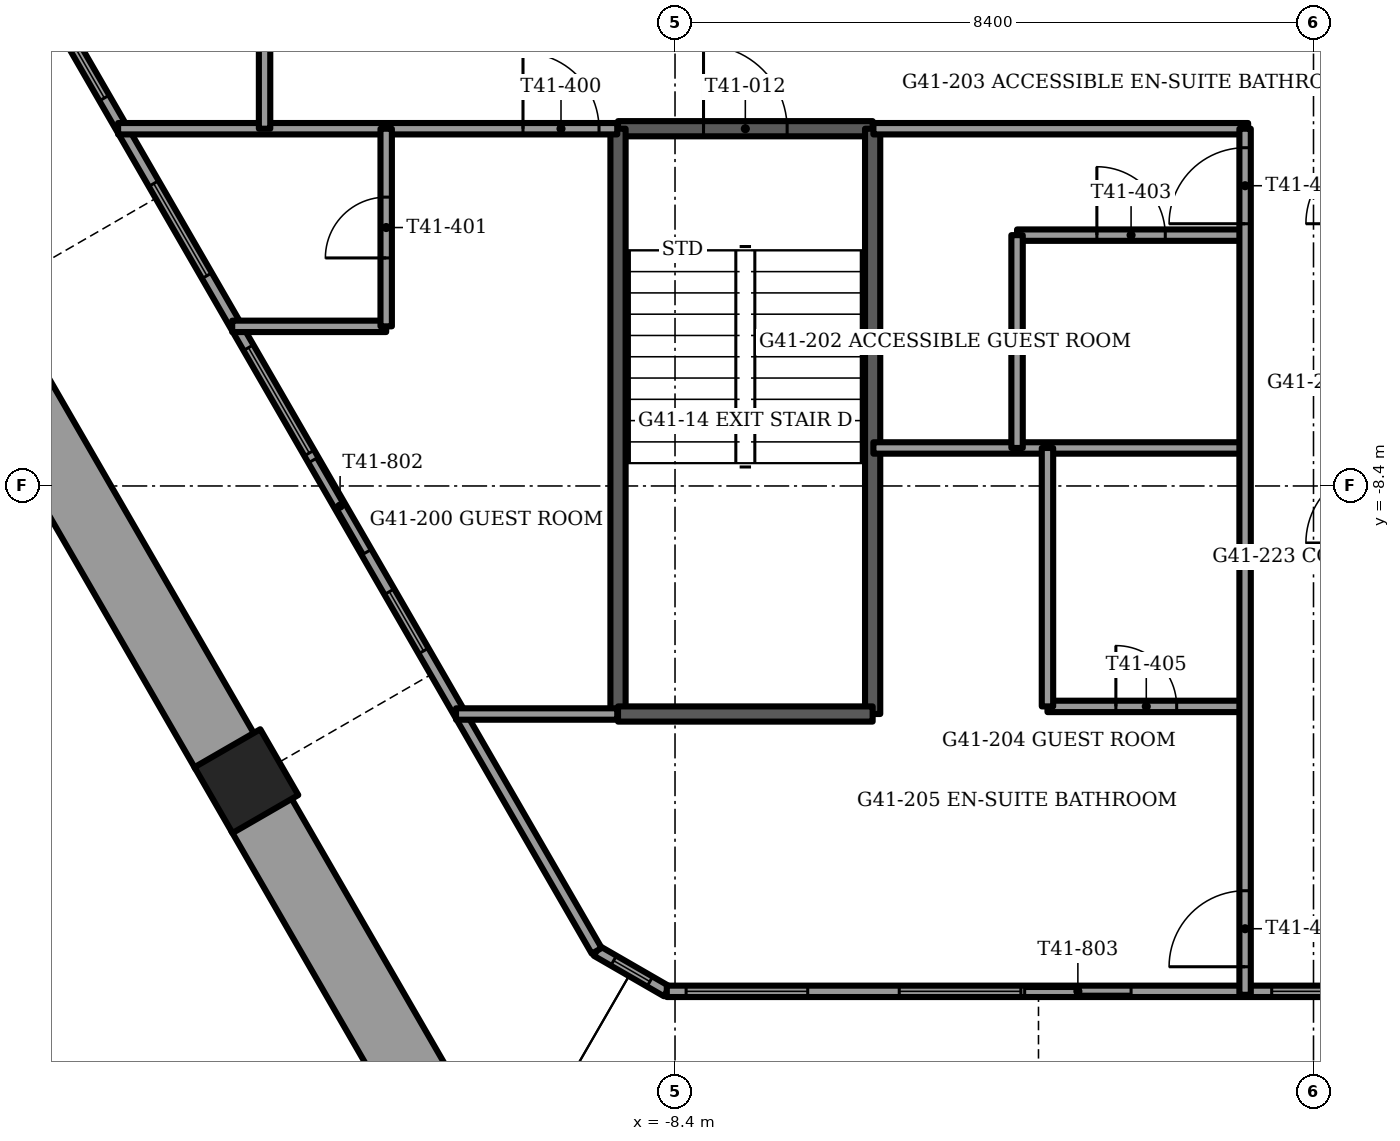
"""IFC4 building model, lengths in metres.
Left out: names, types, materials, properties, quantities, classifications, styles, units other than length and angle.
Written with IfcOpenShell. Run it as: python <this file> out.ifc"""

import sys

from ifc_helpers import new_model, si_unit, direction, frame, frame_2d, origin, origin_2d, place, context, subcontext, project, spatial, rectangle, extrude, element, fill, save


model = new_model("IFC4")
c1 = context("Model", 3, precision=1e-05, world=origin(), true_north=direction((0.0, 1.0)))
c2 = subcontext(c1, "Body", "Model", "MODEL_VIEW")
j1 = project(units=[si_unit("LENGTHUNIT", "METRE"), si_unit("PLANEANGLEUNIT", "RADIAN")], contexts=[c1])
p1 = place(None, origin())
s1 = spatial("IfcSite", under=j1, at=p1, CompositionType="ELEMENT")
p2 = place(p1, origin())
s2 = spatial("IfcBuilding", under=s1, at=p2, CompositionType="ELEMENT")
p3 = place(p2, frame((0.0, 0.0, 168.25)))
s3 = spatial("IfcBuildingStorey", under=s2, at=p3, CompositionType="ELEMENT", Elevation=168.25)
p4 = place(p3, frame((-14.039, -12.283, -1.2), z_axis=(0.0, 0.0, 1.0), x_axis=(-0.5, 0.866025403784, 0.0)))
e1 = element("IfcColumn", 1, at=p4, inside=s3, PredefinedType="COLUMN", context=c2, shape_type="SweptSolid", body=[
    extrude(rectangle(XDim=1.0, YDim=1.0, at=origin_2d()), origin(), (0.0, 0.0, 1.0), 3.75),
])
p5 = place(p3, frame((-17.466, -6.449, 0.0), z_axis=(0.0, 0.0, 1.0), x_axis=(0.500013351051, -0.866017695414, 0.0)))
e2 = element("IfcWall", 2, at=p5, inside=s3, PredefinedType="PARAPET", context=c2, shape_type="SweptSolid", body=[
    extrude(rectangle(XDim=6.296, YDim=0.9, at=frame_2d((3.148, 0.0))), origin(), (0.0, 0.0, 1.0), 1.1),
])
p6 = place(p3, frame((-13.847, -12.715, 0.0), z_axis=(0.0, 0.0, 1.0), x_axis=(0.499961976493, -0.866047355554, 0.0)))
e3 = element("IfcWall", 3, at=p6, inside=s3, PredefinedType="PARAPET", context=c2, shape_type="SweptSolid", body=[
    extrude(rectangle(XDim=5.529, YDim=0.9, at=frame_2d((2.765, 0.0))), origin(), (0.0, 0.0, 1.0), 1.1),
])
p7 = place(p3, frame((-17.287, -0.909, 0.0), z_axis=(0.0, 0.0, 1.0), x_axis=(0.500004460396, -0.866022828558, 0.0)))
e4 = element("IfcWall", 4, at=p7, inside=s3, PredefinedType="SOLIDWALL", context=c2, shape_type="SweptSolid", body=[
    extrude(rectangle(XDim=15.712, YDim=0.15, at=frame_2d((7.856, 0.0))), origin(), (0.0, 0.0, 1.0), 3.45),
])
p8 = place(p7, frame((1.856, 0.0, 0.15)))
e5 = element("IfcOpeningElement", 5, at=p8, cuts=e4, PredefinedType="OPENING", context=c2, shape_type="SweptSolid", body=[
    extrude(rectangle(XDim=0.9, YDim=2.85, at=frame_2d((0.45, 1.425))), frame((0.0, 0.075, 0.0), z_axis=(0.0, -1.0, 0.0), x_axis=(1.0, 0.0, 0.0)), (0.0, 0.0, 1.0), 0.15),
])
p9 = place(p7, frame((4.056, 0.0, 0.15)))
e6 = element("IfcOpeningElement", 6, at=p9, cuts=e4, PredefinedType="OPENING", context=c2, shape_type="SweptSolid", body=[
    extrude(rectangle(XDim=1.4, YDim=2.85, at=frame_2d((0.7, 1.425))), frame((0.0, 0.075, 0.0), z_axis=(0.0, -1.0, 0.0), x_axis=(1.0, 0.0, 0.0)), (0.0, 0.0, 1.0), 0.15),
])
p10 = place(p7, frame((6.549, 0.0, 0.15)))
e7 = element("IfcOpeningElement", 7, at=p10, cuts=e4, PredefinedType="OPENING", context=c2, shape_type="SweptSolid", body=[
    extrude(rectangle(XDim=1.6, YDim=2.85, at=frame_2d((0.8, 1.425))), frame((0.0, 0.075, 0.0), z_axis=(0.0, -1.0, 0.0), x_axis=(1.0, 0.0, 0.0)), (0.0, 0.0, 1.0), 0.15),
])
p11 = place(p7, frame((8.256, 0.0, 0.0)))
e8 = element("IfcOpeningElement", 8, at=p11, cuts=e4, PredefinedType="OPENING", context=c2, shape_type="SweptSolid", body=[
    extrude(rectangle(XDim=1.4, YDim=2.4, at=frame_2d((0.7, 1.2))), frame((0.0, 0.075, 0.0), z_axis=(0.0, -1.0, 0.0), x_axis=(1.0, 0.0, 0.0)), (0.0, 0.0, 1.0), 0.15),
])
p12 = place(p7, frame((10.256, 0.0, 0.15)))
e9 = element("IfcOpeningElement", 9, at=p12, cuts=e4, PredefinedType="OPENING", context=c2, shape_type="SweptSolid", body=[
    extrude(rectangle(XDim=0.9, YDim=2.85, at=frame_2d((0.45, 1.425))), frame((0.0, 0.075, 0.0), z_axis=(0.0, -1.0, 0.0), x_axis=(1.0, 0.0, 0.0)), (0.0, 0.0, 1.0), 0.15),
])
p13 = place(p3, frame((-8.508, -15.049, 0.0), z_axis=(0.0, 0.0, 1.0), x_axis=(1.0, 0.0, 0.0)))
e10 = element("IfcWall", 10, at=p13, inside=s3, PredefinedType="SOLIDWALL", context=c2, shape_type="SweptSolid", body=[
    extrude(rectangle(XDim=17.016, YDim=0.15, at=frame_2d((8.508, 0.0))), origin(), (0.0, 0.0, 1.0), 3.45),
])
p14 = place(p13, frame((3.058, 0.0, 0.15)))
e11 = element("IfcOpeningElement", 11, at=p14, cuts=e10, PredefinedType="OPENING", context=c2, shape_type="SweptSolid", body=[
    extrude(rectangle(XDim=1.6, YDim=2.85, at=frame_2d((0.8, 1.425))), frame((0.0, 0.075, 0.0), z_axis=(0.0, -1.0, 0.0), x_axis=(1.0, 0.0, 0.0)), (0.0, 0.0, 1.0), 0.15),
])
p15 = place(p13, frame((4.708, 0.0, 0.0)))
e12 = element("IfcOpeningElement", 12, at=p15, cuts=e10, PredefinedType="OPENING", context=c2, shape_type="SweptSolid", body=[
    extrude(rectangle(XDim=1.4, YDim=2.4, at=frame_2d((0.7, 1.2))), frame((0.0, 0.075, 0.0), z_axis=(0.0, -1.0, 0.0), x_axis=(1.0, 0.0, 0.0)), (0.0, 0.0, 1.0), 0.15),
])
p16 = place(p13, frame((7.958, 0.0, 0.15)))
e13 = element("IfcOpeningElement", 13, at=p16, cuts=e10, PredefinedType="OPENING", context=c2, shape_type="SweptSolid", body=[
    extrude(rectangle(XDim=0.9, YDim=2.85, at=frame_2d((0.45, 1.425))), frame((0.0, 0.075, 0.0), z_axis=(0.0, -1.0, 0.0), x_axis=(1.0, 0.0, 0.0)), (0.0, 0.0, 1.0), 0.15),
])
p17 = place(p13, frame((12.358, 0.0, 0.15)))
e14 = element("IfcOpeningElement", 14, at=p17, cuts=e10, PredefinedType="OPENING", context=c2, shape_type="SweptSolid", body=[
    extrude(rectangle(XDim=1.6, YDim=2.85, at=frame_2d((0.8, 1.425))), frame((0.0, 0.075, 0.0), z_axis=(0.0, -1.0, 0.0), x_axis=(1.0, 0.0, 0.0)), (0.0, 0.0, 1.0), 0.15),
])
p18 = place(p13, frame((0.254, 0.0, 0.15)))
e15 = element("IfcOpeningElement", 15, at=p18, cuts=e10, PredefinedType="OPENING", context=c2, shape_type="SweptSolid", body=[
    extrude(rectangle(XDim=1.6, YDim=2.73, at=frame_2d((0.8, 1.365))), frame((0.0, 0.075, 0.0), z_axis=(0.0, -1.0, 0.0), x_axis=(1.0, 0.0, 0.0)), (0.0, 0.0, 1.0), 0.15),
])
p19 = place(p13, frame((15.162, 0.0, 0.15)))
e16 = element("IfcOpeningElement", 16, at=p19, cuts=e10, PredefinedType="OPENING", context=c2, shape_type="SweptSolid", body=[
    extrude(rectangle(XDim=1.6, YDim=2.73, at=frame_2d((0.8, 1.365))), frame((0.0, 0.075, 0.0), z_axis=(0.0, -1.0, 0.0), x_axis=(1.0, 0.0, 0.0)), (0.0, 0.0, 1.0), 0.15),
])
p20 = place(p3, frame((-9.43, -14.516, 0.0), z_axis=(0.0, 0.0, 1.0), x_axis=(0.866048165231, -0.499960573946, 0.0)))
e17 = element("IfcWall", 17, at=p20, inside=s3, PredefinedType="SOLIDWALL", context=c2, shape_type="SweptSolid", body=[
    extrude(rectangle(XDim=1.065, YDim=0.15, at=frame_2d((0.532, 0.0))), origin(), (0.0, 0.0, 1.0), 3.45),
])
p21 = place(p20, frame((0.258, 0.0, 0.15)))
e18 = element("IfcOpeningElement", 18, at=p21, cuts=e17, PredefinedType="OPENING", context=c2, shape_type="SweptSolid", body=[
    extrude(rectangle(XDim=0.55, YDim=2.85, at=frame_2d((0.275, 1.425))), frame((0.0, 0.075, 0.0), z_axis=(0.0, -1.0, 0.0), x_axis=(1.0, 0.0, 0.0)), (0.0, 0.0, 1.0), 0.15),
])
p22 = place(p3, frame((-9.15, -3.7, -0.3), z_axis=(0.0, 0.0, 1.0), x_axis=(1.0, 0.0, 0.0)))
e19 = element("IfcWall", 19, at=p22, inside=s3, PredefinedType="SOLIDWALL", context=c2, shape_type="SweptSolid", body=[
    extrude(rectangle(XDim=3.35, YDim=0.2, at=frame_2d((1.675, 0.0))), origin(), (0.0, 0.0, 1.0), 3.75),
])
p23 = place(p22, frame((1.125, 0.0, 0.0)))
e20 = element("IfcOpeningElement", 20, at=p23, cuts=e19, PredefinedType="OPENING", context=c2, shape_type="SweptSolid", body=[
    extrude(rectangle(XDim=1.1, YDim=2.1, at=frame_2d((0.55, 1.05))), frame((0.0, 0.1, 0.0), z_axis=(0.0, -1.0, 0.0), x_axis=(1.0, 0.0, 0.0)), (0.0, 0.0, 1.0), 0.2),
])
for number, where, z_axis, x_axis in (
    (21, (-9.15, -3.7, -0.3), (0.0, 0.0, 1.0), (0.0, -1.0, 0.0)),
    (22, (-5.8, -3.7, -0.3), (0.0, 0.0, 1.0), (0.0, -1.0, 0.0)),
):
    element("IfcWall", number, at=place(p3, frame(where, z_axis=z_axis, x_axis=x_axis)), inside=s3, PredefinedType="SOLIDWALL", context=c2, shape_type="SweptSolid", body=[
        extrude(rectangle(XDim=7.7, YDim=0.2, at=frame_2d((3.85, 0.0))), origin(), (0.0, 0.0, 1.0), 3.75),
    ])
p24 = place(p3, frame((-9.15, -11.4, -0.3), z_axis=(0.0, 0.0, 1.0), x_axis=(1.0, 0.0, 0.0)))
e23 = element("IfcWall", 23, at=p24, inside=s3, PredefinedType="SOLIDWALL", context=c2, shape_type="SweptSolid", body=[
    extrude(rectangle(XDim=3.35, YDim=0.2, at=frame_2d((1.675, 0.0))), origin(), (0.0, 0.0, 1.0), 3.75),
])
p25 = place(p3, frame((-11.281, -11.4, 0.0), z_axis=(0.0, 0.0, 1.0), x_axis=(1.0, 0.0, 0.0)))
e24 = element("IfcWall", 24, at=p25, inside=s3, PredefinedType="PARTITIONING", context=c2, shape_type="SweptSolid", body=[
    extrude(rectangle(XDim=2.121, YDim=0.15, at=frame_2d((1.061, 0.0))), origin(), (0.0, 0.0, 1.0), 3.45),
])
p26 = place(p3, frame((-3.5, -11.3, 0.0), z_axis=(0.0, 0.0, 1.0), x_axis=(1.0, 0.0, 0.0)))
e25 = element("IfcWall", 25, at=p26, inside=s3, PredefinedType="PARTITIONING", context=c2, shape_type="SweptSolid", body=[
    extrude(rectangle(XDim=2.6, YDim=0.15, at=frame_2d((1.3, 0.0))), origin(), (0.0, 0.0, 1.0), 3.45),
])
p27 = place(p26, frame((0.9, 0.0, 0.0)))
e26 = element("IfcOpeningElement", 26, at=p27, cuts=e25, PredefinedType="OPENING", context=c2, shape_type="SweptSolid", body=[
    extrude(rectangle(XDim=0.8, YDim=2.1, at=frame_2d((0.4, 1.05))), frame((0.0, 0.075, 0.0), z_axis=(0.0, -1.0, 0.0), x_axis=(1.0, 0.0, 0.0)), (0.0, 0.0, 1.0), 0.15),
])
p28 = place(p3, frame((-5.79, -7.9, 0.0), z_axis=(0.0, 0.0, 1.0), x_axis=(1.0, 0.0, 0.0)))
e27 = element("IfcWall", 27, at=p28, inside=s3, PredefinedType="PARTITIONING", context=c2, shape_type="SweptSolid", body=[
    extrude(rectangle(XDim=4.89, YDim=0.15, at=frame_2d((2.445, 0.0))), origin(), (0.0, 0.0, 1.0), 3.45),
])
p29 = place(p3, frame((-14.226, -6.3, 0.0), z_axis=(0.0, 0.0, 1.0), x_axis=(1.0, 0.0, 0.0)))
e28 = element("IfcWall", 28, at=p29, inside=s3, PredefinedType="PARTITIONING", context=c2, shape_type="SweptSolid", body=[
    extrude(rectangle(XDim=2.026, YDim=0.15, at=frame_2d((1.013, 0.0))), origin(), (0.0, 0.0, 1.0), 3.45),
])
p30 = place(p3, frame((-3.9, -5.1, 0.0), z_axis=(0.0, 0.0, 1.0), x_axis=(1.0, 0.0, 0.0)))
e29 = element("IfcWall", 29, at=p30, inside=s3, PredefinedType="PARTITIONING", context=c2, shape_type="SweptSolid", body=[
    extrude(rectangle(XDim=3.0, YDim=0.15, at=frame_2d((1.5, 0.0))), origin(), (0.0, 0.0, 1.0), 3.45),
])
p31 = place(p30, frame((1.05, 0.0, 0.0)))
e30 = element("IfcOpeningElement", 30, at=p31, cuts=e29, PredefinedType="OPENING", context=c2, shape_type="SweptSolid", body=[
    extrude(rectangle(XDim=0.9, YDim=2.1, at=frame_2d((0.45, 1.05))), frame((0.0, 0.075, 0.0), z_axis=(0.0, -1.0, 0.0), x_axis=(1.0, 0.0, 0.0)), (0.0, 0.0, 1.0), 0.15),
])
p32 = place(p3, frame((-15.727, -3.7, 0.0), z_axis=(0.0, 0.0, 1.0), x_axis=(1.0, 0.0, 0.0)))
e31 = element("IfcWall", 31, at=p32, inside=s3, PredefinedType="PARTITIONING", context=c2, shape_type="SweptSolid", body=[
    extrude(rectangle(XDim=6.567, YDim=0.15, at=frame_2d((3.284, 0.0))), origin(), (0.0, 0.0, 1.0), 3.45),
])
p33 = place(p32, frame((5.327, 0.0, 0.0)))
e32 = element("IfcOpeningElement", 32, at=p33, cuts=e31, PredefinedType="OPENING", context=c2, shape_type="SweptSolid", body=[
    extrude(rectangle(XDim=1.0, YDim=2.1, at=frame_2d((0.5, 1.05))), frame((0.0, 0.075, 0.0), z_axis=(0.0, -1.0, 0.0), x_axis=(1.0, 0.0, 0.0)), (0.0, 0.0, 1.0), 0.15),
])
p34 = place(p3, frame((-5.79, -3.7, 0.0), z_axis=(0.0, 0.0, 1.0), x_axis=(1.0, 0.0, 0.0)))
e33 = element("IfcWall", 33, at=p34, inside=s3, PredefinedType="PARTITIONING", context=c2, shape_type="SweptSolid", body=[
    extrude(rectangle(XDim=4.93, YDim=0.15, at=frame_2d((2.465, 0.0))), origin(), (0.0, 0.0, 1.0), 3.45),
])
p35 = place(p3, frame((-0.9, -15.094, 0.0), z_axis=(0.0, 0.0, 1.0), x_axis=(0.0, 1.0, 0.0)))
e34 = element("IfcWall", 34, at=p35, inside=s3, PredefinedType="PARTITIONING", context=c2, shape_type="SweptSolid", body=[
    extrude(rectangle(XDim=11.394, YDim=0.15, at=frame_2d((5.697, 0.0))), origin(), (0.0, 0.0, 1.0), 3.45),
])
p36 = place(p35, frame((10.144, 0.0, 0.0)))
e35 = element("IfcOpeningElement", 35, at=p36, cuts=e34, PredefinedType="OPENING", context=c2, shape_type="SweptSolid", body=[
    extrude(rectangle(XDim=1.0, YDim=2.1, at=frame_2d((0.5, 1.05))), frame((0.0, 0.075, 0.0), z_axis=(0.0, -1.0, 0.0), x_axis=(1.0, 0.0, 0.0)), (0.0, 0.0, 1.0), 0.15),
])
p37 = place(p35, frame((0.369, 0.0, 0.0)))
e36 = element("IfcOpeningElement", 36, at=p37, cuts=e34, PredefinedType="OPENING", context=c2, shape_type="SweptSolid", body=[
    extrude(rectangle(XDim=1.0, YDim=2.1, at=frame_2d((0.5, 1.05))), frame((0.0, 0.075, 0.0), z_axis=(0.0, -1.0, 0.0), x_axis=(1.0, 0.0, 0.0)), (0.0, 0.0, 1.0), 0.15),
])
p38 = place(p3, frame((-3.5, -11.3, 0.0), z_axis=(0.0, 0.0, 1.0), x_axis=(0.0, 1.0, 0.0)))
e37 = element("IfcWall", 37, at=p38, inside=s3, PredefinedType="PARTITIONING", context=c2, shape_type="SweptSolid", body=[
    extrude(rectangle(XDim=3.4, YDim=0.15, at=frame_2d((1.7, 0.0))), origin(), (0.0, 0.0, 1.0), 3.45),
])
p39 = place(p3, frame((-3.9, -7.9, 0.0), z_axis=(0.0, 0.0, 1.0), x_axis=(0.0, 1.0, 0.0)))
e38 = element("IfcWall", 38, at=p39, inside=s3, PredefinedType="PARTITIONING", context=c2, shape_type="SweptSolid", body=[
    extrude(rectangle(XDim=2.8, YDim=0.15, at=frame_2d((1.4, 0.0))), origin(), (0.0, 0.0, 1.0), 3.45),
])
p40 = place(p3, frame((-12.2, -6.3, 0.0), z_axis=(0.0, 0.0, 1.0), x_axis=(0.0, 1.0, 0.0)))
e39 = element("IfcWall", 39, at=p40, inside=s3, PredefinedType="PARTITIONING", context=c2, shape_type="SweptSolid", body=[
    extrude(rectangle(XDim=2.6, YDim=0.15, at=frame_2d((1.3, 0.0))), origin(), (0.0, 0.0, 1.0), 3.45),
])
p41 = place(p40, frame((0.9, 0.0, 0.0)))
e40 = element("IfcOpeningElement", 40, at=p41, cuts=e39, PredefinedType="OPENING", context=c2, shape_type="SweptSolid", body=[
    extrude(rectangle(XDim=0.8, YDim=2.1, at=frame_2d((0.4, 1.05))), frame((0.0, 0.075, 0.0), z_axis=(0.0, -1.0, 0.0), x_axis=(1.0, 0.0, 0.0)), (0.0, 0.0, 1.0), 0.15),
])
p42 = place(p3, frame((-13.8, -3.7, 0.0), z_axis=(0.0, 0.0, 1.0), x_axis=(0.0, 1.0, 0.0)))
e41 = element("IfcWall", 41, at=p42, inside=s3, PredefinedType="PARTITIONING", context=c2, shape_type="SweptSolid", body=[
    extrude(rectangle(XDim=2.0, YDim=0.15, at=frame_2d((1.0, 0.0))), origin(), (0.0, 0.0, 1.0), 3.45),
])
p43 = place(p8, origin())
e42 = element("IfcWindow", 42, at=p43, inside=s3, PartitioningType="SINGLE_PANEL", PredefinedType="WINDOW", context=c2, shape_type="SweptSolid", body=[
    extrude(rectangle(XDim=0.9, YDim=2.85, at=frame_2d((0.45, 1.425))), frame((0.0, 0.03, 0.0), z_axis=(0.0, -1.0, 0.0), x_axis=(1.0, 0.0, 0.0)), (0.0, 0.0, 1.0), 0.06),
])
fill(e5, e42)
p44 = place(p9, origin())
e43 = element("IfcWindow", 43, at=p44, inside=s3, PartitioningType="SINGLE_PANEL", PredefinedType="WINDOW", context=c2, shape_type="SweptSolid", body=[
    extrude(rectangle(XDim=1.4, YDim=2.85, at=frame_2d((0.7, 1.425))), frame((0.0, 0.03, 0.0), z_axis=(0.0, -1.0, 0.0), x_axis=(1.0, 0.0, 0.0)), (0.0, 0.0, 1.0), 0.06),
])
fill(e6, e43)
p45 = place(p10, origin())
e44 = element("IfcWindow", 44, at=p45, inside=s3, PartitioningType="SINGLE_PANEL", PredefinedType="WINDOW", context=c2, shape_type="SweptSolid", body=[
    extrude(rectangle(XDim=1.6, YDim=2.85, at=frame_2d((0.8, 1.425))), frame((0.0, 0.03, 0.0), z_axis=(0.0, -1.0, 0.0), x_axis=(1.0, 0.0, 0.0)), (0.0, 0.0, 1.0), 0.06),
])
fill(e7, e44)
p46 = place(p11, origin())
e45 = element("IfcDoor", 45, at=p46, inside=s3, OperationType="SLIDING_TO_RIGHT", PredefinedType="DOOR", context=c2, shape_type="SweptSolid", body=[
    extrude(rectangle(XDim=1.4, YDim=2.4, at=frame_2d((0.7, 1.2))), frame((0.0, 0.025, 0.0), z_axis=(0.0, -1.0, 0.0), x_axis=(1.0, 0.0, 0.0)), (0.0, 0.0, 1.0), 0.05),
])
fill(e8, e45)
p47 = place(p12, origin())
e46 = element("IfcWindow", 46, at=p47, inside=s3, PartitioningType="SINGLE_PANEL", PredefinedType="WINDOW", context=c2, shape_type="SweptSolid", body=[
    extrude(rectangle(XDim=0.9, YDim=2.85, at=frame_2d((0.45, 1.425))), frame((0.0, 0.03, 0.0), z_axis=(0.0, -1.0, 0.0), x_axis=(1.0, 0.0, 0.0)), (0.0, 0.0, 1.0), 0.06),
])
fill(e9, e46)
p48 = place(p14, origin())
e47 = element("IfcWindow", 47, at=p48, inside=s3, PartitioningType="SINGLE_PANEL", PredefinedType="WINDOW", context=c2, shape_type="SweptSolid", body=[
    extrude(rectangle(XDim=1.6, YDim=2.85, at=frame_2d((0.8, 1.425))), frame((0.0, 0.03, 0.0), z_axis=(0.0, -1.0, 0.0), x_axis=(1.0, 0.0, 0.0)), (0.0, 0.0, 1.0), 0.06),
])
fill(e11, e47)
p49 = place(p15, origin())
e48 = element("IfcDoor", 48, at=p49, inside=s3, OperationType="SLIDING_TO_LEFT", PredefinedType="DOOR", context=c2, shape_type="SweptSolid", body=[
    extrude(rectangle(XDim=1.4, YDim=2.4, at=frame_2d((0.7, 1.2))), frame((0.0, 0.025, 0.0), z_axis=(0.0, -1.0, 0.0), x_axis=(1.0, 0.0, 0.0)), (0.0, 0.0, 1.0), 0.05),
])
fill(e12, e48)
p50 = place(p16, origin())
e49 = element("IfcWindow", 49, at=p50, inside=s3, PartitioningType="SINGLE_PANEL", PredefinedType="WINDOW", context=c2, shape_type="SweptSolid", body=[
    extrude(rectangle(XDim=0.9, YDim=2.85, at=frame_2d((0.45, 1.425))), frame((0.0, 0.03, 0.0), z_axis=(0.0, -1.0, 0.0), x_axis=(1.0, 0.0, 0.0)), (0.0, 0.0, 1.0), 0.06),
])
fill(e13, e49)
p51 = place(p18, origin())
e50 = element("IfcWindow", 50, at=p51, inside=s3, PartitioningType="SINGLE_PANEL", PredefinedType="WINDOW", context=c2, shape_type="SweptSolid", body=[
    extrude(rectangle(XDim=1.6, YDim=2.73, at=frame_2d((0.8, 1.365))), frame((0.0, 0.03, 0.0), z_axis=(0.0, -1.0, 0.0), x_axis=(1.0, 0.0, 0.0)), (0.0, 0.0, 1.0), 0.06),
])
fill(e15, e50)
p52 = place(p21, origin())
e51 = element("IfcWindow", 51, at=p52, inside=s3, PartitioningType="SINGLE_PANEL", PredefinedType="WINDOW", context=c2, shape_type="SweptSolid", body=[
    extrude(rectangle(XDim=0.55, YDim=2.85, at=frame_2d((0.275, 1.425))), frame((0.0, 0.03, 0.0), z_axis=(0.0, -1.0, 0.0), x_axis=(1.0, 0.0, 0.0)), (0.0, 0.0, 1.0), 0.06),
])
fill(e18, e51)
p53 = place(p23, origin())
e52 = element("IfcDoor", 52, at=p53, inside=s3, OperationType="SINGLE_SWING_LEFT", PredefinedType="DOOR", context=c2, shape_type="SweptSolid", body=[
    extrude(rectangle(XDim=1.1, YDim=2.1, at=frame_2d((0.55, 1.05))), frame((0.0, 0.025, 0.0), z_axis=(0.0, -1.0, 0.0), x_axis=(1.0, 0.0, 0.0)), (0.0, 0.0, 1.0), 0.05),
])
fill(e20, e52)
p54 = place(p33, origin())
e53 = element("IfcDoor", 53, at=p54, inside=s3, OperationType="SINGLE_SWING_RIGHT", PredefinedType="DOOR", context=c2, shape_type="SweptSolid", body=[
    extrude(rectangle(XDim=1.0, YDim=2.1, at=frame_2d((0.5, 1.05))), frame((0.0, 0.025, 0.0), z_axis=(0.0, -1.0, 0.0), x_axis=(1.0, 0.0, 0.0)), (0.0, 0.0, 1.0), 0.05),
])
fill(e32, e53)
p55 = place(p41, origin())
e54 = element("IfcDoor", 54, at=p55, inside=s3, OperationType="SINGLE_SWING_RIGHT", PredefinedType="DOOR", context=c2, shape_type="SweptSolid", body=[
    extrude(rectangle(XDim=0.8, YDim=2.1, at=frame_2d((0.4, 1.05))), frame((0.0, 0.025, 0.0), z_axis=(0.0, -1.0, 0.0), x_axis=(1.0, 0.0, 0.0)), (0.0, 0.0, 1.0), 0.05),
])
fill(e40, e54)
p56 = place(p36, origin())
e55 = element("IfcDoor", 55, at=p56, inside=s3, OperationType="SINGLE_SWING_RIGHT", PredefinedType="DOOR", context=c2, shape_type="SweptSolid", body=[
    extrude(rectangle(XDim=1.0, YDim=2.1, at=frame_2d((0.5, 1.05))), frame((0.0, 0.025, 0.0), z_axis=(0.0, -1.0, 0.0), x_axis=(1.0, 0.0, 0.0)), (0.0, 0.0, 1.0), 0.05),
])
fill(e35, e55)
p57 = place(p31, origin())
e56 = element("IfcDoor", 56, at=p57, inside=s3, OperationType="SINGLE_SWING_RIGHT", PredefinedType="DOOR", context=c2, shape_type="SweptSolid", body=[
    extrude(rectangle(XDim=0.9, YDim=2.1, at=frame_2d((0.45, 1.05))), frame((0.0, 0.025, 0.0), z_axis=(0.0, -1.0, 0.0), x_axis=(1.0, 0.0, 0.0)), (0.0, 0.0, 1.0), 0.05),
])
fill(e30, e56)
p58 = place(p37, origin())
e57 = element("IfcDoor", 57, at=p58, inside=s3, OperationType="SINGLE_SWING_LEFT", PredefinedType="DOOR", context=c2, shape_type="SweptSolid", body=[
    extrude(rectangle(XDim=1.0, YDim=2.1, at=frame_2d((0.5, 1.05))), frame((0.0, 0.025, 0.0), z_axis=(0.0, -1.0, 0.0), x_axis=(1.0, 0.0, 0.0)), (0.0, 0.0, 1.0), 0.05),
])
fill(e36, e57)
p59 = place(p27, origin())
e58 = element("IfcDoor", 58, at=p59, inside=s3, OperationType="SINGLE_SWING_RIGHT", PredefinedType="DOOR", context=c2, shape_type="SweptSolid", body=[
    extrude(rectangle(XDim=0.8, YDim=2.1, at=frame_2d((0.4, 1.05))), frame((0.0, 0.025, 0.0), z_axis=(0.0, -1.0, 0.0), x_axis=(1.0, 0.0, 0.0)), (0.0, 0.0, 1.0), 0.05),
])
fill(e26, e58)
save(model, sys.argv[1])
